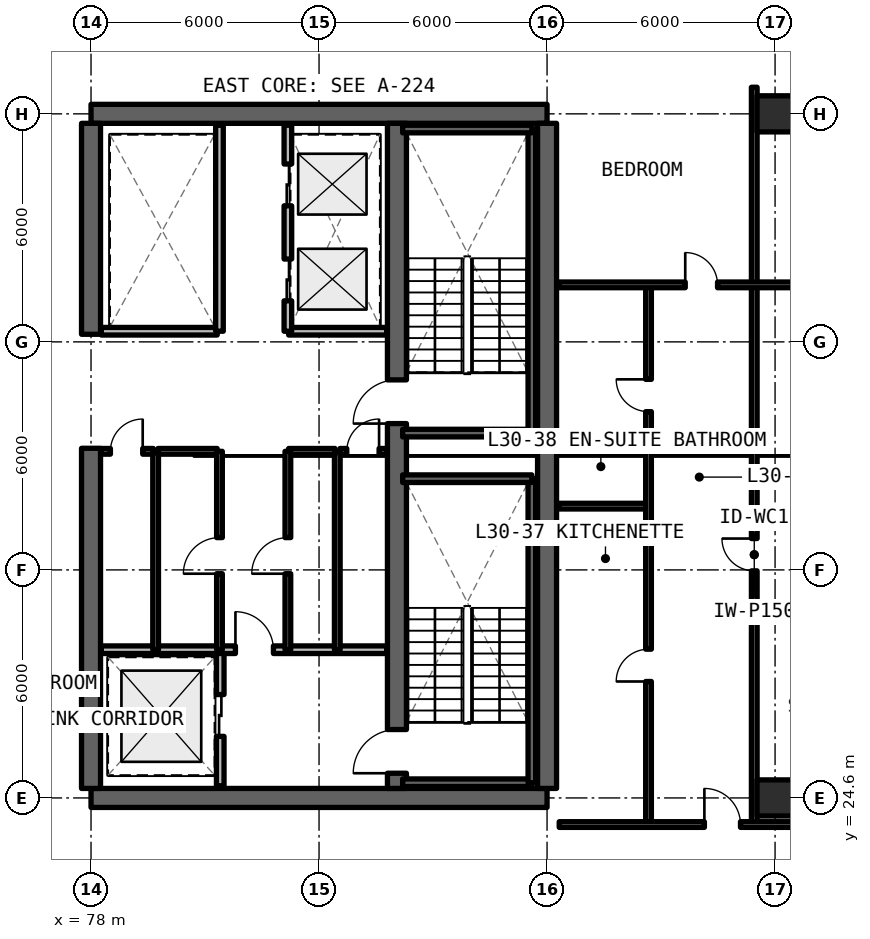
"""IFC4 building model, lengths in metres.
Left out: names, types, materials, properties, quantities, classifications, styles, units other than length and angle.
Written with IfcOpenShell. Run it as: python <this file> out.ifc"""

import sys

from ifc_helpers import new_model, si_unit, direction, frame, frame_2d, origin, origin_2d, place, context, subcontext, project, spatial, rectangle, extrude, element, fill, save


model = new_model("IFC4")
c1 = context("Model", 3, precision=1e-05, world=origin(), true_north=direction((0.0, 1.0)))
c2 = subcontext(c1, "Body", "Model", "MODEL_VIEW")
j1 = project(units=[si_unit("LENGTHUNIT", "METRE"), si_unit("PLANEANGLEUNIT", "RADIAN")], contexts=[c1])
p1 = place(None, origin())
s1 = spatial("IfcSite", under=j1, at=p1, CompositionType="ELEMENT")
p2 = place(p1, origin())
s2 = spatial("IfcBuilding", under=s1, at=p2, CompositionType="ELEMENT")
p3 = place(p2, frame((0.0, 0.0, 108.57)))
s3 = spatial("IfcBuildingStorey", under=s2, at=p3, CompositionType="ELEMENT", Elevation=108.57)
for number, where, z_axis, x_axis in (
    (1, (78.0, 24.6, 0.0), (0.0, 0.0, 1.0), (1.0, 0.0, 0.0)),
    (2, (90.0, 42.6, 0.0), (0.0, 0.0, 1.0), (-1.0, 0.0, 0.0)),
):
    element("IfcWall", number, at=place(p3, frame(where, z_axis=z_axis, x_axis=x_axis)), inside=s3, PredefinedType="SHEAR", context=c2, shape_type="SweptSolid", body=[
        extrude(rectangle(XDim=12.0, YDim=0.5, at=frame_2d((6.0, 0.0))), origin(), (0.0, 0.0, 1.0), 3.63),
    ])
p4 = place(p3, frame((90.0, 24.85, 0.0), z_axis=(0.0, 0.0, 1.0), x_axis=(0.0, 1.0, 0.0)))
e3 = element("IfcWall", 3, at=p4, inside=s3, PredefinedType="SHEAR", context=c2, shape_type="SweptSolid", body=[
    extrude(rectangle(XDim=17.5, YDim=0.5, at=frame_2d((8.75, 0.0))), origin(), (0.0, 0.0, 1.0), 3.63),
])
p5 = place(p3, frame((78.0, 24.85, 0.0), z_axis=(0.0, 0.0, 1.0), x_axis=(0.0, 1.0, 0.0)))
e4 = element("IfcWall", 4, at=p5, inside=s3, PredefinedType="SHEAR", context=c2, shape_type="SweptSolid", body=[
    extrude(rectangle(XDim=8.95, YDim=0.5, at=frame_2d((4.475, 0.0))), origin(), (0.0, 0.0, 1.0), 3.63),
])
p6 = place(p3, frame((78.0, 36.8, 0.0), z_axis=(0.0, 0.0, 1.0), x_axis=(0.0, 1.0, 0.0)))
e5 = element("IfcWall", 5, at=p6, inside=s3, PredefinedType="SHEAR", context=c2, shape_type="SweptSolid", body=[
    extrude(rectangle(XDim=5.55, YDim=0.5, at=frame_2d((2.775, 0.0))), origin(), (0.0, 0.0, 1.0), 3.63),
])
p7 = place(p3, frame((86.05, 24.85, 0.0), z_axis=(0.0, 0.0, 1.0), x_axis=(0.0, 1.0, 0.0)))
e6 = element("IfcWall", 6, at=p7, inside=s3, PredefinedType="SHEAR", context=c2, shape_type="SweptSolid", body=[
    extrude(rectangle(XDim=17.5, YDim=0.5, at=frame_2d((8.75, 0.0))), origin(), (0.0, 0.0, 1.0), 3.63),
])
p8 = place(p7, frame((0.4, 0.0, 0.0)))
e7 = element("IfcOpeningElement", 7, at=p8, cuts=e6, PredefinedType="OPENING", context=c2, shape_type="SweptSolid", body=[
    extrude(rectangle(XDim=1.15, YDim=2.15, at=frame_2d((0.575, 1.075))), frame((0.0, 0.26, 0.0), z_axis=(0.0, -1.0, 0.0), x_axis=(1.0, 0.0, 0.0)), (0.0, 0.0, 1.0), 0.52),
])
p9 = place(p7, frame((9.6, 0.0, 0.0)))
e8 = element("IfcOpeningElement", 8, at=p9, cuts=e6, PredefinedType="OPENING", context=c2, shape_type="SweptSolid", body=[
    extrude(rectangle(XDim=1.15, YDim=2.15, at=frame_2d((0.575, 1.075))), frame((0.0, 0.26, 0.0), z_axis=(0.0, -1.0, 0.0), x_axis=(1.0, 0.0, 0.0)), (0.0, 0.0, 1.0), 0.52),
])
for number, where, z_axis, x_axis in (
    (9, (96.0, 24.6, 0.0), (0.0, 0.0, 1.0), (1.0, 0.0, 0.0)),
    (10, (96.0, 42.6, 0.0), (0.0, 0.0, 1.0), (1.0, 0.0, 0.0)),
):
    element("IfcColumn", number, at=place(p3, frame(where, z_axis=z_axis, x_axis=x_axis)), inside=s3, PredefinedType="COLUMN", context=c2, shape_type="SweptSolid", body=[
        extrude(rectangle(XDim=0.95, YDim=0.95, at=origin_2d()), origin(), (0.0, 0.0, 1.0), 3.63),
    ])
p10 = place(p3, frame((81.4, 24.92, 0.0), z_axis=(0.0, 0.0, 1.0), x_axis=(0.0, 1.0, 0.0)))
e11 = element("IfcWall", 11, at=p10, inside=s3, PredefinedType="SOLIDWALL", context=c2, shape_type="SweptSolid", body=[
    extrude(rectangle(XDim=3.58, YDim=0.2, at=frame_2d((1.79, 0.0))), origin(), (0.0, 0.0, 1.0), 2.63),
])
p11 = place(p10, frame((1.3, 0.0, 0.0)))
e12 = element("IfcOpeningElement", 12, at=p11, cuts=e11, PredefinedType="OPENING", context=c2, shape_type="SweptSolid", body=[
    extrude(rectangle(XDim=1.1, YDim=2.2, at=frame_2d((0.55, 1.1))), frame((0.0, 0.11, 0.0), z_axis=(0.0, -1.0, 0.0), x_axis=(1.0, 0.0, 0.0)), (0.0, 0.0, 1.0), 0.22),
])
p12 = place(p3, frame((78.27, 28.5, 0.0), z_axis=(0.0, 0.0, 1.0), x_axis=(1.0, 0.0, 0.0)))
e13 = element("IfcWall", 13, at=p12, inside=s3, PredefinedType="SOLIDWALL", context=c2, shape_type="SweptSolid", body=[
    extrude(rectangle(XDim=7.51, YDim=0.2, at=frame_2d((3.755, 0.0))), origin(), (0.0, 0.0, 1.0), 2.63),
])
p13 = place(p12, frame((3.53, 0.0, 0.0)))
e14 = element("IfcOpeningElement", 14, at=p13, cuts=e13, PredefinedType="OPENING", context=c2, shape_type="SweptSolid", body=[
    extrude(rectangle(XDim=1.0, YDim=2.15, at=frame_2d((0.5, 1.075))), frame((0.0, 0.11, 0.0), z_axis=(0.0, -1.0, 0.0), x_axis=(1.0, 0.0, 0.0)), (0.0, 0.0, 1.0), 0.22),
])
p14 = place(p3, frame((84.48, 28.5, 0.0), z_axis=(0.0, 0.0, 1.0), x_axis=(0.0, 1.0, 0.0)))
e15 = element("IfcWall", 15, at=p14, inside=s3, PredefinedType="SOLIDWALL", context=c2, shape_type="SweptSolid", body=[
    extrude(rectangle(XDim=5.22, YDim=0.15, at=frame_2d((2.61, 0.0))), origin(), (0.0, 0.0, 1.0), 2.63),
])
p15 = place(p3, frame((84.55, 33.72, 0.0), z_axis=(0.0, 0.0, 1.0), x_axis=(1.0, 0.0, 0.0)))
e16 = element("IfcWall", 16, at=p15, inside=s3, PredefinedType="SOLIDWALL", context=c2, shape_type="SweptSolid", body=[
    extrude(rectangle(XDim=1.23, YDim=0.15, at=frame_2d((0.615, 0.0))), origin(), (0.0, 0.0, 1.0), 2.63),
])
p16 = place(p15, frame((0.18, 0.0, 0.0)))
e17 = element("IfcOpeningElement", 17, at=p16, cuts=e16, PredefinedType="OPENING", context=c2, shape_type="SweptSolid", body=[
    extrude(rectangle(XDim=0.85, YDim=2.1, at=frame_2d((0.425, 1.05))), frame((0.0, 0.085, 0.0), z_axis=(0.0, -1.0, 0.0), x_axis=(1.0, 0.0, 0.0)), (0.0, 0.0, 1.0), 0.17),
])
p17 = place(p3, frame((83.2, 33.72, 0.0), z_axis=(0.0, 0.0, 1.0), x_axis=(1.0, 0.0, 0.0)))
e18 = element("IfcWall", 18, at=p17, inside=s3, PredefinedType="SOLIDWALL", context=c2, shape_type="SweptSolid", body=[
    extrude(rectangle(XDim=1.22, YDim=0.15, at=frame_2d((0.61, 0.0))), origin(), (0.0, 0.0, 1.0), 2.63),
])
p18 = place(p3, frame((83.18, 28.5, 0.0), z_axis=(0.0, 0.0, 1.0), x_axis=(0.0, 1.0, 0.0)))
e19 = element("IfcWall", 19, at=p18, inside=s3, PredefinedType="SOLIDWALL", context=c2, shape_type="SweptSolid", body=[
    extrude(rectangle(XDim=5.22, YDim=0.15, at=frame_2d((2.61, 0.0))), origin(), (0.0, 0.0, 1.0), 2.63),
])
p19 = place(p18, frame((2.0, 0.0, 0.0)))
e20 = element("IfcOpeningElement", 20, at=p19, cuts=e19, PredefinedType="OPENING", context=c2, shape_type="SweptSolid", body=[
    extrude(rectangle(XDim=0.95, YDim=2.15, at=frame_2d((0.475, 1.075))), frame((0.0, 0.085, 0.0), z_axis=(0.0, -1.0, 0.0), x_axis=(1.0, 0.0, 0.0)), (0.0, 0.0, 1.0), 0.17),
])
p20 = place(p3, frame((79.7, 28.5, 0.0), z_axis=(0.0, 0.0, 1.0), x_axis=(0.0, 1.0, 0.0)))
e21 = element("IfcWall", 21, at=p20, inside=s3, PredefinedType="SOLIDWALL", context=c2, shape_type="SweptSolid", body=[
    extrude(rectangle(XDim=5.22, YDim=0.15, at=frame_2d((2.61, 0.0))), origin(), (0.0, 0.0, 1.0), 2.63),
])
p21 = place(p3, frame((79.76, 33.72, 0.0), z_axis=(0.0, 0.0, 1.0), x_axis=(1.0, 0.0, 0.0)))
e22 = element("IfcWall", 22, at=p21, inside=s3, PredefinedType="SOLIDWALL", context=c2, shape_type="SweptSolid", body=[
    extrude(rectangle(XDim=1.56, YDim=0.15, at=frame_2d((0.78, 0.0))), origin(), (0.0, 0.0, 1.0), 2.63),
])
p22 = place(p3, frame((78.27, 33.72, 0.0), z_axis=(0.0, 0.0, 1.0), x_axis=(1.0, 0.0, 0.0)))
e23 = element("IfcWall", 23, at=p22, inside=s3, PredefinedType="SOLIDWALL", context=c2, shape_type="SweptSolid", body=[
    extrude(rectangle(XDim=1.37, YDim=0.15, at=frame_2d((0.685, 0.0))), origin(), (0.0, 0.0, 1.0), 2.63),
])
p23 = place(p22, frame((0.24, 0.0, 0.0)))
e24 = element("IfcOpeningElement", 24, at=p23, cuts=e23, PredefinedType="OPENING", context=c2, shape_type="SweptSolid", body=[
    extrude(rectangle(XDim=0.85, YDim=2.1, at=frame_2d((0.425, 1.05))), frame((0.0, 0.085, 0.0), z_axis=(0.0, -1.0, 0.0), x_axis=(1.0, 0.0, 0.0)), (0.0, 0.0, 1.0), 0.17),
])
p24 = place(p3, frame((81.38, 28.5, 0.0), z_axis=(0.0, 0.0, 1.0), x_axis=(0.0, 1.0, 0.0)))
e25 = element("IfcWall", 25, at=p24, inside=s3, PredefinedType="SOLIDWALL", context=c2, shape_type="SweptSolid", body=[
    extrude(rectangle(XDim=5.22, YDim=0.15, at=frame_2d((2.61, 0.0))), origin(), (0.0, 0.0, 1.0), 2.63),
])
p25 = place(p24, frame((2.0, 0.0, 0.0)))
e26 = element("IfcOpeningElement", 26, at=p25, cuts=e25, PredefinedType="OPENING", context=c2, shape_type="SweptSolid", body=[
    extrude(rectangle(XDim=0.95, YDim=2.15, at=frame_2d((0.475, 1.075))), frame((0.0, 0.085, 0.0), z_axis=(0.0, -1.0, 0.0), x_axis=(1.0, 0.0, 0.0)), (0.0, 0.0, 1.0), 0.17),
])
p26 = place(p3, frame((83.2, 36.88, 0.0), z_axis=(0.0, 0.0, 1.0), x_axis=(1.0, 0.0, 0.0)))
e27 = element("IfcWall", 27, at=p26, inside=s3, PredefinedType="SOLIDWALL", context=c2, shape_type="SweptSolid", body=[
    extrude(rectangle(XDim=2.58, YDim=0.2, at=frame_2d((1.29, 0.0))), origin(), (0.0, 0.0, 1.0), 2.63),
])
p27 = place(p3, frame((83.18, 36.88, 0.0), z_axis=(0.0, 0.0, 1.0), x_axis=(0.0, 1.0, 0.0)))
e28 = element("IfcWall", 28, at=p27, inside=s3, PredefinedType="SOLIDWALL", context=c2, shape_type="SweptSolid", body=[
    extrude(rectangle(XDim=5.42, YDim=0.2, at=frame_2d((2.71, 0.0))), origin(), (0.0, 0.0, 1.0), 2.63),
])
p28 = place(p27, frame((0.8, 0.0, 0.0)))
e29 = element("IfcOpeningElement", 29, at=p28, cuts=e28, PredefinedType="OPENING", context=c2, shape_type="SweptSolid", body=[
    extrude(rectangle(XDim=1.1, YDim=2.2, at=frame_2d((0.55, 1.1))), frame((0.0, 0.11, 0.0), z_axis=(0.0, -1.0, 0.0), x_axis=(1.0, 0.0, 0.0)), (0.0, 0.0, 1.0), 0.22),
])
p29 = place(p27, frame((3.3, 0.0, 0.0)))
e30 = element("IfcOpeningElement", 30, at=p29, cuts=e28, PredefinedType="OPENING", context=c2, shape_type="SweptSolid", body=[
    extrude(rectangle(XDim=1.1, YDim=2.2, at=frame_2d((0.55, 1.1))), frame((0.0, 0.11, 0.0), z_axis=(0.0, -1.0, 0.0), x_axis=(1.0, 0.0, 0.0)), (0.0, 0.0, 1.0), 0.22),
])
p30 = place(p3, frame((78.27, 36.88, 0.0), z_axis=(0.0, 0.0, 1.0), x_axis=(1.0, 0.0, 0.0)))
e31 = element("IfcWall", 31, at=p30, inside=s3, PredefinedType="SOLIDWALL", context=c2, shape_type="SweptSolid", body=[
    extrude(rectangle(XDim=3.05, YDim=0.2, at=frame_2d((1.525, 0.0))), origin(), (0.0, 0.0, 1.0), 2.63),
])
p31 = place(p3, frame((81.38, 36.88, 0.0), z_axis=(0.0, 0.0, 1.0), x_axis=(0.0, 1.0, 0.0)))
e32 = element("IfcWall", 32, at=p31, inside=s3, PredefinedType="SOLIDWALL", context=c2, shape_type="SweptSolid", body=[
    extrude(rectangle(XDim=5.42, YDim=0.2, at=frame_2d((2.71, 0.0))), origin(), (0.0, 0.0, 1.0), 2.63),
])
p32 = place(p3, frame((95.452, 23.9, 0.0), z_axis=(0.0, 0.0, 1.0), x_axis=(0.0, 1.0, 0.0)))
e33 = element("IfcWall", 33, at=p32, inside=s3, PredefinedType="PARTITIONING", context=c2, shape_type="SweptSolid", body=[
    extrude(rectangle(XDim=14.2, YDim=0.15, at=frame_2d((7.1, 0.0))), origin(), (0.0, 0.0, 1.0), 2.63),
])
p33 = place(p32, frame((6.675, 0.0, 0.0)))
e34 = element("IfcOpeningElement", 34, at=p33, cuts=e33, PredefinedType="OPENING", context=c2, shape_type="SweptSolid", body=[
    extrude(rectangle(XDim=0.85, YDim=2.1, at=frame_2d((0.425, 1.05))), frame((0.0, 0.085, 0.0), z_axis=(0.0, -1.0, 0.0), x_axis=(1.0, 0.0, 0.0)), (0.0, 0.0, 1.0), 0.17),
])
p34 = place(p3, frame((90.32, 32.278, 0.0), z_axis=(0.0, 0.0, 1.0), x_axis=(1.0, 0.0, 0.0)))
e35 = element("IfcWall", 35, at=p34, inside=s3, PredefinedType="PARTITIONING", context=c2, shape_type="SweptSolid", body=[
    extrude(rectangle(XDim=2.35, YDim=0.15, at=frame_2d((1.175, 0.0))), origin(), (0.0, 0.0, 1.0), 2.63),
])
p35 = place(p3, frame((92.67, 23.9, 0.0), z_axis=(0.0, 0.0, 1.0), x_axis=(0.0, 1.0, 0.0)))
e36 = element("IfcWall", 36, at=p35, inside=s3, PredefinedType="PARTITIONING", context=c2, shape_type="SweptSolid", body=[
    extrude(rectangle(XDim=14.2, YDim=0.15, at=frame_2d((7.1, 0.0))), origin(), (0.0, 0.0, 1.0), 2.63),
])
p36 = place(p35, frame((3.764, 0.0, 0.0)))
e37 = element("IfcOpeningElement", 37, at=p36, cuts=e36, PredefinedType="OPENING", context=c2, shape_type="SweptSolid", body=[
    extrude(rectangle(XDim=0.85, YDim=2.1, at=frame_2d((0.425, 1.05))), frame((0.0, 0.085, 0.0), z_axis=(0.0, -1.0, 0.0), x_axis=(1.0, 0.0, 0.0)), (0.0, 0.0, 1.0), 0.17),
])
p37 = place(p35, frame((10.864, 0.0, 0.0)))
e38 = element("IfcOpeningElement", 38, at=p37, cuts=e36, PredefinedType="OPENING", context=c2, shape_type="SweptSolid", body=[
    extrude(rectangle(XDim=0.85, YDim=2.1, at=frame_2d((0.425, 1.05))), frame((0.0, 0.085, 0.0), z_axis=(0.0, -1.0, 0.0), x_axis=(1.0, 0.0, 0.0)), (0.0, 0.0, 1.0), 0.17),
])
p38 = place(p3, frame((95.452, 38.1, 0.0), z_axis=(0.0, 0.0, 1.0), x_axis=(0.0, 1.0, 0.0)))
e39 = element("IfcWall", 39, at=p38, inside=s3, PredefinedType="PARTITIONING", context=c2, shape_type="SweptSolid", body=[
    extrude(rectangle(XDim=5.2, YDim=0.15, at=frame_2d((2.6, 0.0))), origin(), (0.0, 0.0, 1.0), 2.63),
])
p39 = place(p3, frame((90.32, 38.1, 0.0), z_axis=(0.0, 0.0, 1.0), x_axis=(1.0, 0.0, 0.0)))
e40 = element("IfcWall", 40, at=p39, inside=s3, PredefinedType="PARTITIONING", context=c2, shape_type="SweptSolid", body=[
    extrude(rectangle(XDim=9.87, YDim=0.15, at=frame_2d((4.935, 0.0))), origin(), (0.0, 0.0, 1.0), 2.63),
])
p40 = place(p39, frame((3.316, 0.0, 0.0)))
e41 = element("IfcOpeningElement", 41, at=p40, cuts=e40, PredefinedType="OPENING", context=c2, shape_type="SweptSolid", body=[
    extrude(rectangle(XDim=0.85, YDim=2.1, at=frame_2d((0.425, 1.05))), frame((0.0, 0.085, 0.0), z_axis=(0.0, -1.0, 0.0), x_axis=(1.0, 0.0, 0.0)), (0.0, 0.0, 1.0), 0.17),
])
p41 = place(p39, frame((7.076, 0.0, 0.0)))
e42 = element("IfcOpeningElement", 42, at=p41, cuts=e40, PredefinedType="OPENING", context=c2, shape_type="SweptSolid", body=[
    extrude(rectangle(XDim=0.85, YDim=2.1, at=frame_2d((0.425, 1.05))), frame((0.0, 0.085, 0.0), z_axis=(0.0, -1.0, 0.0), x_axis=(1.0, 0.0, 0.0)), (0.0, 0.0, 1.0), 0.17),
])
p42 = place(p3, frame((90.32, 23.9, 0.0), z_axis=(0.0, 0.0, 1.0), x_axis=(1.0, 0.0, 0.0)))
e43 = element("IfcWall", 43, at=p42, inside=s3, PredefinedType="SOLIDWALL", context=c2, shape_type="SweptSolid", body=[
    extrude(rectangle(XDim=9.87, YDim=0.15, at=frame_2d((4.935, 0.0))), origin(), (0.0, 0.0, 1.0), 2.63),
])
p43 = place(p42, frame((3.82, 0.0, 0.0)))
e44 = element("IfcOpeningElement", 44, at=p43, cuts=e43, PredefinedType="OPENING", context=c2, shape_type="SweptSolid", body=[
    extrude(rectangle(XDim=0.95, YDim=2.15, at=frame_2d((0.475, 1.075))), frame((0.0, 0.085, 0.0), z_axis=(0.0, -1.0, 0.0), x_axis=(1.0, 0.0, 0.0)), (0.0, 0.0, 1.0), 0.17),
])
p44 = place(p3, frame((86.2, 25.0, 0.0), z_axis=(0.0, 0.0, 1.0), x_axis=(1.0, 0.0, 0.0)))
e45 = element("IfcWall", 45, at=p44, inside=s3, PredefinedType="SOLIDWALL", context=c2, shape_type="SweptSolid", body=[
    extrude(rectangle(XDim=3.4, YDim=0.2, at=frame_2d((1.7, 0.0))), origin(), (0.0, 0.0, 1.0), 3.63),
])
p45 = place(p3, frame((89.6, 25.0, 0.0), z_axis=(0.0, 0.0, 1.0), x_axis=(0.0, 1.0, 0.0)))
e46 = element("IfcWall", 46, at=p45, inside=s3, PredefinedType="SOLIDWALL", context=c2, shape_type="SweptSolid", body=[
    extrude(rectangle(XDim=8.0, YDim=0.2, at=frame_2d((4.0, 0.0))), origin(), (0.0, 0.0, 1.0), 3.63),
])
for number, where, z_axis, x_axis in (
    (47, (89.6, 33.0, 0.0), (0.0, 0.0, 1.0), (-1.0, 0.0, 0.0)),
    (48, (86.2, 34.2, 0.0), (0.0, 0.0, 1.0), (1.0, 0.0, 0.0)),
):
    element("IfcWall", number, at=place(p3, frame(where, z_axis=z_axis, x_axis=x_axis)), inside=s3, PredefinedType="SOLIDWALL", context=c2, shape_type="SweptSolid", body=[
        extrude(rectangle(XDim=3.4, YDim=0.2, at=frame_2d((1.7, 0.0))), origin(), (0.0, 0.0, 1.0), 3.63),
    ])
p46 = place(p3, frame((89.6, 34.2, 0.0), z_axis=(0.0, 0.0, 1.0), x_axis=(0.0, 1.0, 0.0)))
e49 = element("IfcWall", 49, at=p46, inside=s3, PredefinedType="SOLIDWALL", context=c2, shape_type="SweptSolid", body=[
    extrude(rectangle(XDim=8.0, YDim=0.2, at=frame_2d((4.0, 0.0))), origin(), (0.0, 0.0, 1.0), 3.63),
])
p47 = place(p3, frame((89.6, 42.2, 0.0), z_axis=(0.0, 0.0, 1.0), x_axis=(-1.0, 0.0, 0.0)))
e50 = element("IfcWall", 50, at=p47, inside=s3, PredefinedType="SOLIDWALL", context=c2, shape_type="SweptSolid", body=[
    extrude(rectangle(XDim=3.4, YDim=0.2, at=frame_2d((1.7, 0.0))), origin(), (0.0, 0.0, 1.0), 3.63),
])
p48 = place(p11, origin())
e51 = element("IfcDoor", 51, at=p48, inside=s3, OperationType="SLIDING_TO_LEFT", PredefinedType="DOOR", context=c2, shape_type="SweptSolid", body=[
    extrude(rectangle(XDim=1.1, YDim=2.2, at=frame_2d((0.55, 1.1))), frame((0.0, 0.025, 0.0), z_axis=(0.0, -1.0, 0.0), x_axis=(1.0, 0.0, 0.0)), (0.0, 0.0, 1.0), 0.05),
])
fill(e12, e51)
p49 = place(p13, origin())
e52 = element("IfcDoor", 52, at=p49, inside=s3, OperationType="SINGLE_SWING_LEFT", PredefinedType="DOOR", context=c2, shape_type="SweptSolid", body=[
    extrude(rectangle(XDim=1.0, YDim=2.15, at=frame_2d((0.5, 1.075))), frame((0.0, 0.025, 0.0), z_axis=(0.0, -1.0, 0.0), x_axis=(1.0, 0.0, 0.0)), (0.0, 0.0, 1.0), 0.05),
])
fill(e14, e52)
p50 = place(p16, origin())
e53 = element("IfcDoor", 53, at=p50, inside=s3, OperationType="SINGLE_SWING_RIGHT", PredefinedType="DOOR", context=c2, shape_type="SweptSolid", body=[
    extrude(rectangle(XDim=0.85, YDim=2.1, at=frame_2d((0.425, 1.05))), frame((0.0, 0.025, 0.0), z_axis=(0.0, -1.0, 0.0), x_axis=(1.0, 0.0, 0.0)), (0.0, 0.0, 1.0), 0.05),
])
fill(e17, e53)
p51 = place(p19, origin())
e54 = element("IfcDoor", 54, at=p51, inside=s3, OperationType="SINGLE_SWING_LEFT", PredefinedType="DOOR", context=c2, shape_type="SweptSolid", body=[
    extrude(rectangle(XDim=0.95, YDim=2.15, at=frame_2d((0.475, 1.075))), frame((0.0, 0.025, 0.0), z_axis=(0.0, -1.0, 0.0), x_axis=(1.0, 0.0, 0.0)), (0.0, 0.0, 1.0), 0.05),
])
fill(e20, e54)
p52 = place(p23, origin())
e55 = element("IfcDoor", 55, at=p52, inside=s3, OperationType="SINGLE_SWING_RIGHT", PredefinedType="DOOR", context=c2, shape_type="SweptSolid", body=[
    extrude(rectangle(XDim=0.85, YDim=2.1, at=frame_2d((0.425, 1.05))), frame((0.0, 0.025, 0.0), z_axis=(0.0, -1.0, 0.0), x_axis=(1.0, 0.0, 0.0)), (0.0, 0.0, 1.0), 0.05),
])
fill(e24, e55)
p53 = place(p25, origin())
e56 = element("IfcDoor", 56, at=p53, inside=s3, OperationType="SINGLE_SWING_LEFT", PredefinedType="DOOR", context=c2, shape_type="SweptSolid", body=[
    extrude(rectangle(XDim=0.95, YDim=2.15, at=frame_2d((0.475, 1.075))), frame((0.0, 0.025, 0.0), z_axis=(0.0, -1.0, 0.0), x_axis=(1.0, 0.0, 0.0)), (0.0, 0.0, 1.0), 0.05),
])
fill(e26, e56)
p54 = place(p28, origin())
e57 = element("IfcDoor", 57, at=p54, inside=s3, OperationType="SLIDING_TO_LEFT", PredefinedType="DOOR", context=c2, shape_type="SweptSolid", body=[
    extrude(rectangle(XDim=1.1, YDim=2.2, at=frame_2d((0.55, 1.1))), frame((0.0, 0.025, 0.0), z_axis=(0.0, -1.0, 0.0), x_axis=(1.0, 0.0, 0.0)), (0.0, 0.0, 1.0), 0.05),
])
fill(e29, e57)
p55 = place(p29, origin())
e58 = element("IfcDoor", 58, at=p55, inside=s3, OperationType="SLIDING_TO_RIGHT", PredefinedType="DOOR", context=c2, shape_type="SweptSolid", body=[
    extrude(rectangle(XDim=1.1, YDim=2.2, at=frame_2d((0.55, 1.1))), frame((0.0, 0.025, 0.0), z_axis=(0.0, -1.0, 0.0), x_axis=(1.0, 0.0, 0.0)), (0.0, 0.0, 1.0), 0.05),
])
fill(e30, e58)
p56 = place(p33, origin())
e59 = element("IfcDoor", 59, at=p56, inside=s3, OperationType="SINGLE_SWING_RIGHT", PredefinedType="DOOR", context=c2, shape_type="SweptSolid", body=[
    extrude(rectangle(XDim=0.85, YDim=2.1, at=frame_2d((0.425, 1.05))), frame((0.0, 0.025, 0.0), z_axis=(0.0, -1.0, 0.0), x_axis=(1.0, 0.0, 0.0)), (0.0, 0.0, 1.0), 0.05),
])
fill(e34, e59)
p57 = place(p36, origin())
e60 = element("IfcDoor", 60, at=p57, inside=s3, OperationType="SINGLE_SWING_LEFT", PredefinedType="DOOR", context=c2, shape_type="SweptSolid", body=[
    extrude(rectangle(XDim=0.85, YDim=2.1, at=frame_2d((0.425, 1.05))), frame((0.0, 0.025, 0.0), z_axis=(0.0, -1.0, 0.0), x_axis=(1.0, 0.0, 0.0)), (0.0, 0.0, 1.0), 0.05),
])
fill(e37, e60)
p58 = place(p37, origin())
e61 = element("IfcDoor", 61, at=p58, inside=s3, OperationType="SINGLE_SWING_RIGHT", PredefinedType="DOOR", context=c2, shape_type="SweptSolid", body=[
    extrude(rectangle(XDim=0.85, YDim=2.1, at=frame_2d((0.425, 1.05))), frame((0.0, 0.025, 0.0), z_axis=(0.0, -1.0, 0.0), x_axis=(1.0, 0.0, 0.0)), (0.0, 0.0, 1.0), 0.05),
])
fill(e38, e61)
p59 = place(p40, origin())
e62 = element("IfcDoor", 62, at=p59, inside=s3, OperationType="SINGLE_SWING_LEFT", PredefinedType="DOOR", context=c2, shape_type="SweptSolid", body=[
    extrude(rectangle(XDim=0.85, YDim=2.1, at=frame_2d((0.425, 1.05))), frame((0.0, 0.025, 0.0), z_axis=(0.0, -1.0, 0.0), x_axis=(1.0, 0.0, 0.0)), (0.0, 0.0, 1.0), 0.05),
])
fill(e41, e62)
p60 = place(p43, origin())
e63 = element("IfcDoor", 63, at=p60, inside=s3, OperationType="SINGLE_SWING_LEFT", PredefinedType="DOOR", context=c2, shape_type="SweptSolid", body=[
    extrude(rectangle(XDim=0.95, YDim=2.15, at=frame_2d((0.475, 1.075))), frame((0.0, 0.025, 0.0), z_axis=(0.0, -1.0, 0.0), x_axis=(1.0, 0.0, 0.0)), (0.0, 0.0, 1.0), 0.05),
])
fill(e44, e63)
p61 = place(p8, origin())
e64 = element("IfcDoor", 64, at=p61, inside=s3, OperationType="SINGLE_SWING_RIGHT", PredefinedType="DOOR", context=c2, shape_type="SweptSolid", body=[
    extrude(rectangle(XDim=1.15, YDim=2.15, at=frame_2d((0.575, 1.075))), frame((0.0, 0.025, 0.0), z_axis=(0.0, -1.0, 0.0), x_axis=(1.0, 0.0, 0.0)), (0.0, 0.0, 1.0), 0.05),
])
fill(e7, e64)
p62 = place(p9, origin())
e65 = element("IfcDoor", 65, at=p62, inside=s3, OperationType="SINGLE_SWING_LEFT", PredefinedType="DOOR", context=c2, shape_type="SweptSolid", body=[
    extrude(rectangle(XDim=1.15, YDim=2.15, at=frame_2d((0.575, 1.075))), frame((0.0, 0.025, 0.0), z_axis=(0.0, -1.0, 0.0), x_axis=(1.0, 0.0, 0.0)), (0.0, 0.0, 1.0), 0.05),
])
fill(e8, e65)
save(model, sys.argv[1])
